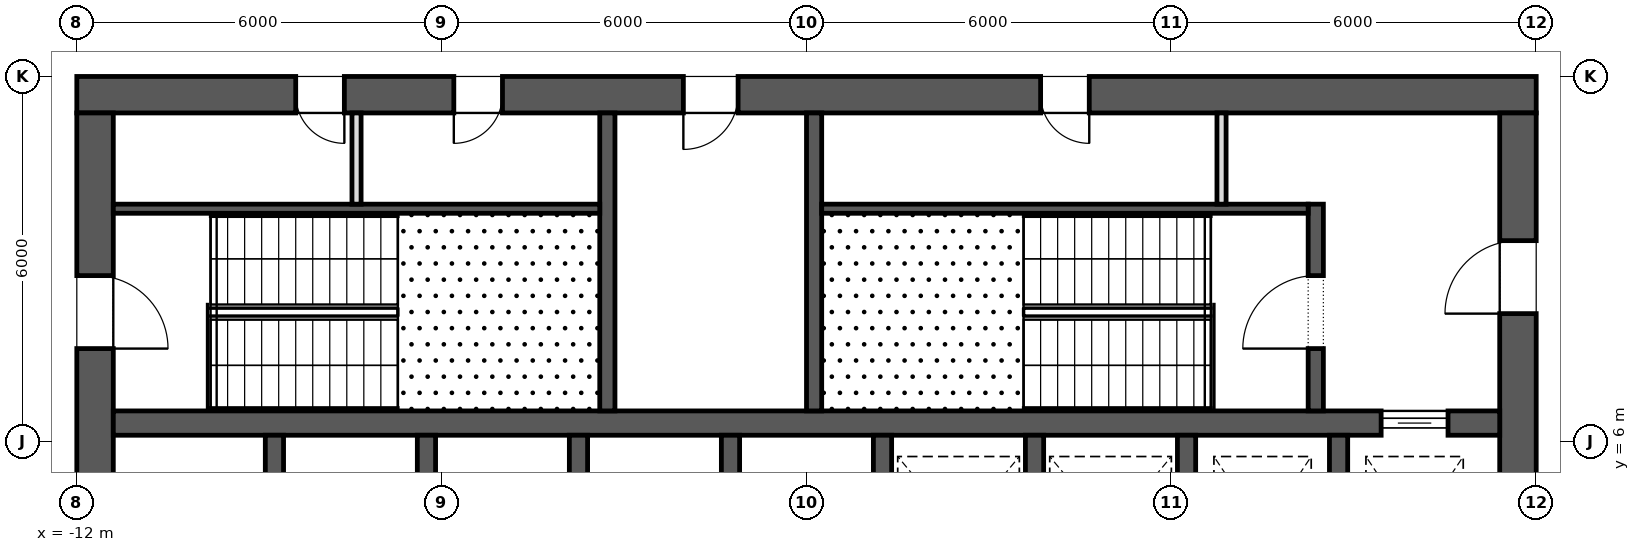
"""IFC4 building model, lengths in metres.
Left out: names, types, materials, properties, quantities, classifications, styles, units other than length and angle.
Written with IfcOpenShell. Run it as: python <this file> out.ifc"""

import sys

from ifc_helpers import new_model, si_unit, direction, frame, frame_2d, origin, place, context, subcontext, project, spatial, rectangle, extrude, element, fill, save


model = new_model("IFC4")
c1 = context("Model", 3, precision=1e-05, world=origin(), true_north=direction((0.0, 1.0)))
c2 = subcontext(c1, "Body", "Model", "MODEL_VIEW")
j1 = project(units=[si_unit("LENGTHUNIT", "METRE"), si_unit("PLANEANGLEUNIT", "RADIAN")], contexts=[c1])
p1 = place(None, origin())
s1 = spatial("IfcSite", under=j1, at=p1, CompositionType="ELEMENT")
p2 = place(p1, origin())
s2 = spatial("IfcBuilding", under=s1, at=p2, CompositionType="ELEMENT")
p3 = place(p2, frame((0.0, 0.0, 104.5)))
s3 = spatial("IfcBuildingStorey", under=s2, at=p3, CompositionType="ELEMENT", Elevation=104.5)
p4 = place(p3, frame((-12.0, 11.7, 0.0), z_axis=(0.0, 0.0, 1.0), x_axis=(1.0, 0.0, 0.0)))
e1 = element("IfcWall", 1, at=p4, inside=s3, PredefinedType="SHEAR", context=c2, shape_type="SweptSolid", body=[
    extrude(rectangle(XDim=24.0, YDim=0.6, at=frame_2d((12.0, 0.0))), origin(), (0.0, 0.0, 1.0), 4.2),
])
p5 = place(p4, frame((9.975, 0.0, 0.0)))
e2 = element("IfcOpeningElement", 2, at=p5, cuts=e1, PredefinedType="OPENING", context=c2, shape_type="SweptSolid", body=[
    extrude(rectangle(XDim=0.9, YDim=2.1, at=frame_2d((0.45, 1.05))), frame((0.0, 0.312, 0.0), z_axis=(0.0, -1.0, 0.0), x_axis=(1.0, 0.0, 0.0)), (0.0, 0.0, 1.0), 0.624),
])
p6 = place(p4, frame((3.6, 0.0, 0.0)))
e3 = element("IfcOpeningElement", 3, at=p6, cuts=e1, PredefinedType="OPENING", context=c2, shape_type="SweptSolid", body=[
    extrude(rectangle(XDim=0.8, YDim=2.1, at=frame_2d((0.4, 1.05))), frame((0.0, 0.312, 0.0), z_axis=(0.0, -1.0, 0.0), x_axis=(1.0, 0.0, 0.0)), (0.0, 0.0, 1.0), 0.624),
])
p7 = place(p4, frame((6.2, 0.0, 0.0)))
e4 = element("IfcOpeningElement", 4, at=p7, cuts=e1, PredefinedType="OPENING", context=c2, shape_type="SweptSolid", body=[
    extrude(rectangle(XDim=0.8, YDim=2.1, at=frame_2d((0.4, 1.05))), frame((0.0, 0.312, 0.0), z_axis=(0.0, -1.0, 0.0), x_axis=(1.0, 0.0, 0.0)), (0.0, 0.0, 1.0), 0.624),
])
p8 = place(p4, frame((15.85, 0.0, 0.0)))
e5 = element("IfcOpeningElement", 5, at=p8, cuts=e1, PredefinedType="OPENING", context=c2, shape_type="SweptSolid", body=[
    extrude(rectangle(XDim=0.8, YDim=2.1, at=frame_2d((0.4, 1.05))), frame((0.0, 0.312, 0.0), z_axis=(0.0, -1.0, 0.0), x_axis=(1.0, 0.0, 0.0)), (0.0, 0.0, 1.0), 0.624),
])
p9 = place(p3, frame((11.7, -11.4, 0.0), z_axis=(0.0, 0.0, 1.0), x_axis=(0.0, 1.0, 0.0)))
e6 = element("IfcWall", 6, at=p9, inside=s3, PredefinedType="SHEAR", context=c2, shape_type="SweptSolid", body=[
    extrude(rectangle(XDim=22.8, YDim=0.6, at=frame_2d((11.4, 0.0))), origin(), (0.0, 0.0, 1.0), 4.2),
])
p10 = place(p9, frame((10.2, 0.0, 0.0)))
e7 = element("IfcOpeningElement", 7, at=p10, cuts=e6, PredefinedType="OPENING", context=c2, shape_type="SweptSolid", body=[
    extrude(rectangle(XDim=2.4, YDim=2.1, at=frame_2d((1.2, 1.05))), frame((0.0, 0.312, 0.0), z_axis=(0.0, -1.0, 0.0), x_axis=(1.0, 0.0, 0.0)), (0.0, 0.0, 1.0), 0.624),
])
p11 = place(p9, frame((19.5, 0.0, 0.0)))
e8 = element("IfcOpeningElement", 8, at=p11, cuts=e6, PredefinedType="OPENING", context=c2, shape_type="SweptSolid", body=[
    extrude(rectangle(XDim=1.2, YDim=2.1, at=frame_2d((0.6, 1.05))), frame((0.0, 0.312, 0.0), z_axis=(0.0, -1.0, 0.0), x_axis=(1.0, 0.0, 0.0)), (0.0, 0.0, 1.0), 0.624),
])
p12 = place(p9, frame((2.1, 0.0, 0.0)))
e9 = element("IfcOpeningElement", 9, at=p12, cuts=e6, PredefinedType="OPENING", context=c2, shape_type="SweptSolid", body=[
    extrude(rectangle(XDim=1.2, YDim=2.1, at=frame_2d((0.6, 1.05))), frame((0.0, 0.312, 0.0), z_axis=(0.0, -1.0, 0.0), x_axis=(1.0, 0.0, 0.0)), (0.0, 0.0, 1.0), 0.624),
])
p13 = place(p3, frame((-11.7, -11.4, 0.0), z_axis=(0.0, 0.0, 1.0), x_axis=(0.0, 1.0, 0.0)))
e10 = element("IfcWall", 10, at=p13, inside=s3, PredefinedType="SHEAR", context=c2, shape_type="SweptSolid", body=[
    extrude(rectangle(XDim=22.8, YDim=0.6, at=frame_2d((11.4, 0.0))), origin(), (0.0, 0.0, 1.0), 4.2),
])
p14 = place(p13, frame((10.2, 0.0, 0.0)))
e11 = element("IfcOpeningElement", 11, at=p14, cuts=e10, PredefinedType="OPENING", context=c2, shape_type="SweptSolid", body=[
    extrude(rectangle(XDim=2.4, YDim=2.1, at=frame_2d((1.2, 1.05))), frame((0.0, 0.312, 0.0), z_axis=(0.0, -1.0, 0.0), x_axis=(1.0, 0.0, 0.0)), (0.0, 0.0, 1.0), 0.624),
])
p15 = place(p13, frame((18.925, 0.0, 0.0)))
e12 = element("IfcOpeningElement", 12, at=p15, cuts=e10, PredefinedType="OPENING", context=c2, shape_type="SweptSolid", body=[
    extrude(rectangle(XDim=1.2, YDim=2.1, at=frame_2d((0.6, 1.05))), frame((0.0, 0.312, 0.0), z_axis=(0.0, -1.0, 0.0), x_axis=(1.0, 0.0, 0.0)), (0.0, 0.0, 1.0), 0.624),
])
p16 = place(p13, frame((2.675, 0.0, 0.0)))
e13 = element("IfcOpeningElement", 13, at=p16, cuts=e10, PredefinedType="OPENING", context=c2, shape_type="SweptSolid", body=[
    extrude(rectangle(XDim=1.2, YDim=2.1, at=frame_2d((0.6, 1.05))), frame((0.0, 0.312, 0.0), z_axis=(0.0, -1.0, 0.0), x_axis=(1.0, 0.0, 0.0)), (0.0, 0.0, 1.0), 0.624),
])
p17 = place(p3, frame((-11.4, 6.3, 0.0), z_axis=(0.0, 0.0, 1.0), x_axis=(1.0, 0.0, 0.0)))
e14 = element("IfcWall", 14, at=p17, inside=s3, PredefinedType="SHEAR", context=c2, shape_type="SweptSolid", body=[
    extrude(rectangle(XDim=22.8, YDim=0.4, at=frame_2d((11.4, 0.0))), origin(), (0.0, 0.0, 1.0), 4.2),
])
p18 = place(p17, frame((20.85, 0.0, 0.0)))
e15 = element("IfcOpeningElement", 15, at=p18, cuts=e14, PredefinedType="OPENING", context=c2, shape_type="SweptSolid", body=[
    extrude(rectangle(XDim=1.1, YDim=2.1, at=frame_2d((0.55, 1.05))), frame((0.0, 0.212, 0.0), z_axis=(0.0, -1.0, 0.0), x_axis=(1.0, 0.0, 0.0)), (0.0, 0.0, 1.0), 0.424),
])
for number, where, z_axis, x_axis in (
    (16, (-8.75, 3.2, 0.0), (0.0, 0.0, 1.0), (0.0, 1.0, 0.0)),
    (17, (-6.25, 3.2, 0.0), (0.0, 0.0, 1.0), (0.0, 1.0, 0.0)),
    (18, (-3.75, 3.2, 0.0), (0.0, 0.0, 1.0), (0.0, 1.0, 0.0)),
    (19, (-1.25, 3.2, 0.0), (0.0, 0.0, 1.0), (0.0, 1.0, 0.0)),
    (20, (1.25, 3.2, 0.0), (0.0, 0.0, 1.0), (0.0, 1.0, 0.0)),
    (21, (3.75, 3.2, 0.0), (0.0, 0.0, 1.0), (0.0, 1.0, 0.0)),
    (22, (6.25, 3.2, 0.0), (0.0, 0.0, 1.0), (0.0, 1.0, 0.0)),
    (23, (8.75, 3.2, 0.0), (0.0, 0.0, 1.0), (0.0, 1.0, 0.0)),
):
    element("IfcWall", number, at=place(p3, frame(where, z_axis=z_axis, x_axis=x_axis)), inside=s3, PredefinedType="SHEAR", context=c2, shape_type="SweptSolid", body=[
        extrude(rectangle(XDim=2.9, YDim=0.3, at=frame_2d((1.45, 0.0))), origin(), (0.0, 0.0, 1.0), 4.2),
    ])
for number, where, z_axis, x_axis in (
    (24, (-3.275, 6.5, 0.0), (0.0, 0.0, 1.0), (0.0, 1.0, 0.0)),
    (25, (0.125, 6.5, 0.0), (0.0, 0.0, 1.0), (0.0, 1.0, 0.0)),
):
    element("IfcWall", number, at=place(p3, frame(where, z_axis=z_axis, x_axis=x_axis)), inside=s3, PredefinedType="SHEAR", context=c2, shape_type="SweptSolid", body=[
        extrude(rectangle(XDim=4.9, YDim=0.25, at=frame_2d((2.45, 0.0))), origin(), (0.0, 0.0, 1.0), 3.9),
    ])
p19 = place(p3, frame((8.375, 6.5, 0.0), z_axis=(0.0, 0.0, 1.0), x_axis=(0.0, 1.0, 0.0)))
e26 = element("IfcWall", 26, at=p19, inside=s3, PredefinedType="SHEAR", context=c2, shape_type="SweptSolid", body=[
    extrude(rectangle(XDim=3.4, YDim=0.25, at=frame_2d((1.7, 0.0))), origin(), (0.0, 0.0, 1.0), 3.9),
])
p20 = place(p19, frame((1.025, 0.0, 0.0)))
e27 = element("IfcOpeningElement", 27, at=p20, cuts=e26, PredefinedType="OPENING", context=c2, shape_type="SweptSolid", body=[
    extrude(rectangle(XDim=1.2, YDim=2.1, at=frame_2d((0.6, 1.05))), frame((0.0, 0.137, 0.0), z_axis=(0.0, -1.0, 0.0), x_axis=(1.0, 0.0, 0.0)), (0.0, 0.0, 1.0), 0.274),
])
for number, where, z_axis, x_axis in (
    (28, (-11.4, 9.825, 0.0), (0.0, 0.0, 1.0), (1.0, 0.0, 0.0)),
    (29, (0.25, 9.825, 0.0), (0.0, 0.0, 1.0), (1.0, 0.0, 0.0)),
):
    element("IfcWall", number, at=place(p3, frame(where, z_axis=z_axis, x_axis=x_axis)), inside=s3, PredefinedType="SHEAR", context=c2, shape_type="SweptSolid", body=[
        extrude(rectangle(XDim=8.0, YDim=0.15, at=frame_2d((4.0, 0.0))), origin(), (0.0, 0.0, 1.0), 3.9),
    ])
for number, where, z_axis, x_axis in (
    (30, (-7.4, 9.9, 0.0), (0.0, 0.0, 1.0), (0.0, 1.0, 0.0)),
    (31, (6.825, 9.9, 0.0), (0.0, 0.0, 1.0), (0.0, 1.0, 0.0)),
):
    element("IfcWall", number, at=place(p3, frame(where, z_axis=z_axis, x_axis=x_axis)), inside=s3, PredefinedType="PARTITIONING", context=c2, shape_type="SweptSolid", body=[
        extrude(rectangle(XDim=1.5, YDim=0.15, at=frame_2d((0.75, 0.0))), origin(), (0.0, 0.0, 1.0), 3.9),
    ])
p21 = place(p18, origin())
e32 = element("IfcDoor", 32, at=p21, inside=s3, OperationType="SLIDING_TO_LEFT", PredefinedType="DOOR", context=c2, shape_type="SweptSolid", body=[
    extrude(rectangle(XDim=1.1, YDim=2.1, at=frame_2d((0.55, 1.05))), frame((0.0, 0.025, 0.0), z_axis=(0.0, -1.0, 0.0), x_axis=(1.0, 0.0, 0.0)), (0.0, 0.0, 1.0), 0.05),
])
fill(e15, e32)
p22 = place(p15, frame((1.2, 0.0, 0.0), z_axis=(0.0, 0.0, 1.0), x_axis=(-1.0, 0.0, 0.0)))
e33 = element("IfcDoor", 33, at=p22, inside=s3, OperationType="SINGLE_SWING_LEFT", PredefinedType="DOOR", context=c2, shape_type="SweptSolid", body=[
    extrude(rectangle(XDim=1.2, YDim=2.1, at=frame_2d((0.6, 1.05))), frame((0.0, 0.025, 0.0), z_axis=(0.0, -1.0, 0.0), x_axis=(1.0, 0.0, 0.0)), (0.0, 0.0, 1.0), 0.05),
])
fill(e12, e33)
p23 = place(p20, origin())
e34 = element("IfcDoor", 34, at=p23, inside=s3, OperationType="SINGLE_SWING_RIGHT", PredefinedType="DOOR", context=c2, shape_type="SweptSolid", body=[
    extrude(rectangle(XDim=1.2, YDim=2.1, at=frame_2d((0.6, 1.05))), frame((0.0, 0.025, 0.0), z_axis=(0.0, -1.0, 0.0), x_axis=(1.0, 0.0, 0.0)), (0.0, 0.0, 1.0), 0.05),
])
fill(e27, e34)
p24 = place(p11, origin())
e35 = element("IfcDoor", 35, at=p24, inside=s3, OperationType="SINGLE_SWING_RIGHT", PredefinedType="DOOR", context=c2, shape_type="SweptSolid", body=[
    extrude(rectangle(XDim=1.2, YDim=2.1, at=frame_2d((0.6, 1.05))), frame((0.0, 0.025, 0.0), z_axis=(0.0, -1.0, 0.0), x_axis=(1.0, 0.0, 0.0)), (0.0, 0.0, 1.0), 0.05),
])
fill(e8, e35)
p25 = place(p5, frame((0.9, 0.0, 0.0), z_axis=(0.0, 0.0, 1.0), x_axis=(-1.0, 0.0, 0.0)))
e36 = element("IfcDoor", 36, at=p25, inside=s3, OperationType="SINGLE_SWING_LEFT", PredefinedType="DOOR", context=c2, shape_type="SweptSolid", body=[
    extrude(rectangle(XDim=0.9, YDim=2.1, at=frame_2d((0.45, 1.05))), frame((0.0, 0.025, 0.0), z_axis=(0.0, -1.0, 0.0), x_axis=(1.0, 0.0, 0.0)), (0.0, 0.0, 1.0), 0.05),
])
fill(e2, e36)
p26 = place(p6, frame((0.8, 0.0, 0.0), z_axis=(0.0, 0.0, 1.0), x_axis=(-1.0, 0.0, 0.0)))
e37 = element("IfcDoor", 37, at=p26, inside=s3, OperationType="SINGLE_SWING_RIGHT", PredefinedType="DOOR", context=c2, shape_type="SweptSolid", body=[
    extrude(rectangle(XDim=0.8, YDim=2.1, at=frame_2d((0.4, 1.05))), frame((0.0, 0.025, 0.0), z_axis=(0.0, -1.0, 0.0), x_axis=(1.0, 0.0, 0.0)), (0.0, 0.0, 1.0), 0.05),
])
fill(e3, e37)
p27 = place(p7, frame((0.8, 0.0, 0.0), z_axis=(0.0, 0.0, 1.0), x_axis=(-1.0, 0.0, 0.0)))
e38 = element("IfcDoor", 38, at=p27, inside=s3, OperationType="SINGLE_SWING_LEFT", PredefinedType="DOOR", context=c2, shape_type="SweptSolid", body=[
    extrude(rectangle(XDim=0.8, YDim=2.1, at=frame_2d((0.4, 1.05))), frame((0.0, 0.025, 0.0), z_axis=(0.0, -1.0, 0.0), x_axis=(1.0, 0.0, 0.0)), (0.0, 0.0, 1.0), 0.05),
])
fill(e4, e38)
p28 = place(p8, frame((0.8, 0.0, 0.0), z_axis=(0.0, 0.0, 1.0), x_axis=(-1.0, 0.0, 0.0)))
e39 = element("IfcDoor", 39, at=p28, inside=s3, OperationType="SINGLE_SWING_RIGHT", PredefinedType="DOOR", context=c2, shape_type="SweptSolid", body=[
    extrude(rectangle(XDim=0.8, YDim=2.1, at=frame_2d((0.4, 1.05))), frame((0.0, 0.025, 0.0), z_axis=(0.0, -1.0, 0.0), x_axis=(1.0, 0.0, 0.0)), (0.0, 0.0, 1.0), 0.05),
])
fill(e5, e39)
save(model, sys.argv[1])
